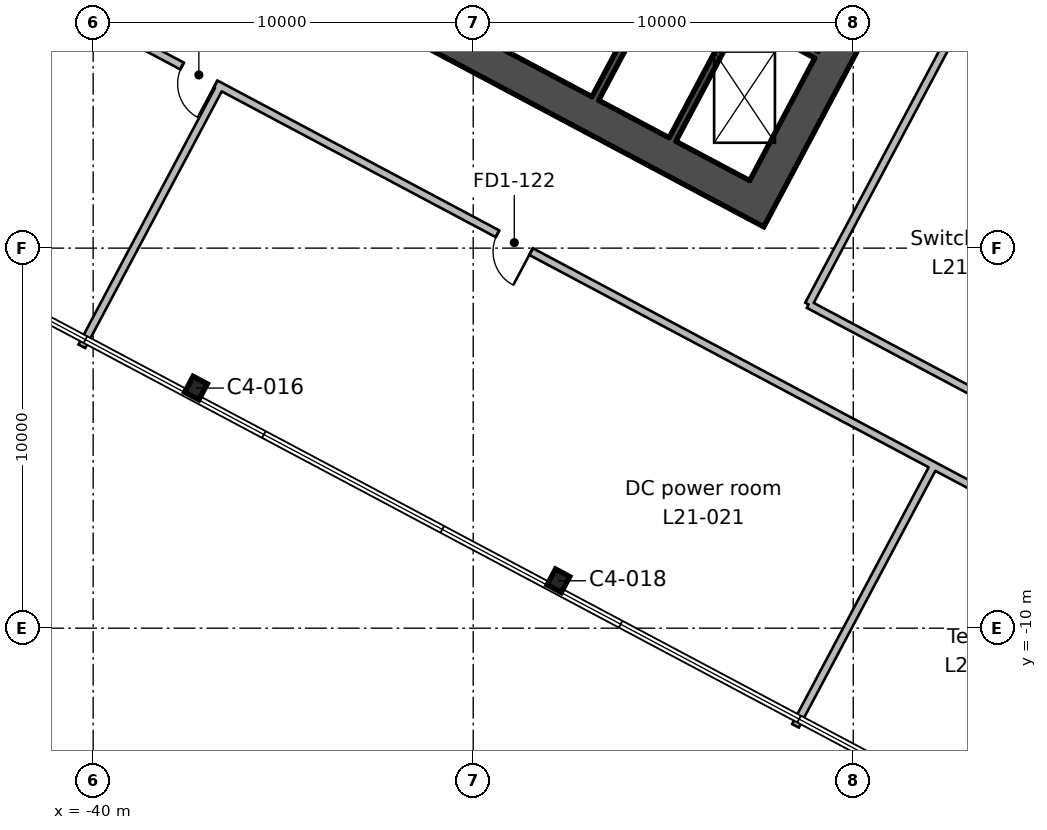
"""IFC4 building model, lengths in metres.
Left out: names, types, materials, properties, quantities, classifications, styles, units other than length and angle.
Written with IfcOpenShell. Run it as: python <this file> out.ifc"""

import sys

from ifc_helpers import new_model, si_unit, direction, frame, frame_2d, origin, origin_2d, place, context, subcontext, project, spatial, rectangle, i_section, extrude, element, fill, save


model = new_model("IFC4")
c1 = context("Model", 3, precision=1e-05, world=origin(), true_north=direction((0.0, 1.0)))
c2 = subcontext(c1, "Body", "Model", "MODEL_VIEW")
j1 = project(units=[si_unit("LENGTHUNIT", "METRE"), si_unit("PLANEANGLEUNIT", "RADIAN")], contexts=[c1])
p1 = place(None, origin())
s1 = spatial("IfcSite", under=j1, at=p1, CompositionType="ELEMENT")
p2 = place(p1, origin())
s2 = spatial("IfcBuilding", under=s1, at=p2, CompositionType="ELEMENT")
p3 = place(p2, frame((0.0, 0.0, 107.6)))
s3 = spatial("IfcBuildingStorey", under=s2, at=p3, CompositionType="ELEMENT", Elevation=107.6)
for number, where, z_axis, x_axis in (
    (1, (-27.758, -8.753, 0.0), (0.0, 0.0, 1.0), (0.883, -0.469, 0.0)),
    (2, (-37.294, -3.682, 0.0), (0.0, 0.0, 1.0), (0.883, -0.469, 0.0)),
):
    element("IfcColumn", number, at=place(p3, frame(where, z_axis=z_axis, x_axis=x_axis)), inside=s3, PredefinedType="COLUMN", context=c2, shape_type="SweptSolid", body=[
        extrude(i_section(OverallWidth=0.424, OverallDepth=0.475, WebThickness=0.048, FlangeThickness=0.077, FilletRadius=0.015, at=origin_2d()), origin(), (0.0, 0.0, 1.0), 4.6),
    ])
p4 = place(p3, frame((-13.362, 18.43, 0.0), z_axis=(0.0, 0.0, 1.0), x_axis=(-0.46947084998, -0.882947971864, 0.0)))
e3 = element("IfcWall", 3, at=p4, inside=s3, PredefinedType="SHEAR", context=c2, shape_type="SweptSolid", body=[
    extrude(rectangle(XDim=20.0, YDim=0.9, at=frame_2d((10.0, 0.0))), origin(), (0.0, 0.0, 1.0), 4.6),
])
p5 = place(p4, frame((7.0, 0.0, 0.0)))
e4 = element("IfcOpeningElement", 4, at=p5, cuts=e3, PredefinedType="OPENING", context=c2, shape_type="SweptSolid", body=[
    extrude(rectangle(XDim=2.4, YDim=2.4, at=frame_2d((1.2, 1.2))), frame((0.0, 0.46, 0.0), z_axis=(0.0, -1.0, 0.0), x_axis=(1.0, 0.0, 0.0)), (0.0, 0.0, 1.0), 0.92),
])
p6 = place(p3, frame((-22.937, 1.38, 0.0), z_axis=(0.0, 0.0, 1.0), x_axis=(-0.88295276571, 0.46946183394, 0.0)))
e5 = element("IfcWall", 5, at=p6, inside=s3, PredefinedType="SHEAR", context=c2, shape_type="SweptSolid", body=[
    extrude(rectangle(XDim=20.2, YDim=0.9, at=frame_2d((10.1, 0.0))), origin(), (0.0, 0.0, 1.0), 4.6),
])
p7 = place(p3, frame((-23.043, 6.08, 0.0), z_axis=(0.0, 0.0, 1.0), x_axis=(-0.469494272526, -0.882935517501, 0.0)))
e6 = element("IfcWall", 6, at=p7, inside=s3, PredefinedType="SHEAR", context=c2, shape_type="SweptSolid", body=[
    extrude(rectangle(XDim=3.65, YDim=0.2, at=frame_2d((1.825, 0.0))), origin(), (0.0, 0.0, 1.0), 4.6),
])
p8 = place(p3, frame((-23.36, 10.382, 0.0), z_axis=(0.0, 0.0, 1.0), x_axis=(-0.469480409012, -0.88294288918, 0.0)))
e7 = element("IfcWall", 7, at=p8, inside=s3, PredefinedType="SHEAR", context=c2, shape_type="SweptSolid", body=[
    extrude(rectangle(XDim=7.3, YDim=0.2, at=frame_2d((3.65, 0.0))), origin(), (0.0, 0.0, 1.0), 4.6),
])
p9 = place(p3, frame((-20.965, 5.088, 0.0), z_axis=(0.0, 0.0, 1.0), x_axis=(-0.882925986334, 0.469512196493, 0.0)))
e8 = element("IfcWall", 8, at=p9, inside=s3, PredefinedType="SHEAR", context=c2, shape_type="SweptSolid", body=[
    extrude(rectangle(XDim=4.5, YDim=0.2, at=frame_2d((2.25, 0.0))), origin(), (0.0, 0.0, 1.0), 4.6),
])
p10 = place(p9, frame((0.6, 0.0, 0.0)))
e9 = element("IfcOpeningElement", 9, at=p10, cuts=e8, PredefinedType="OPENING", context=c2, shape_type="SweptSolid", body=[
    extrude(rectangle(XDim=1.1, YDim=2.1, at=frame_2d((0.55, 1.05))), frame((0.0, 0.11, 0.0), z_axis=(0.0, -1.0, 0.0), x_axis=(1.0, 0.0, 0.0)), (0.0, 0.0, 1.0), 0.22),
])
p11 = place(p3, frame((-36.658, 4.259, 0.0), z_axis=(0.0, 0.0, 1.0), x_axis=(-0.469538267285, -0.882912122215, 0.0)))
e10 = element("IfcWall", 10, at=p11, inside=s3, PredefinedType="PARTITIONING", context=c2, shape_type="SweptSolid", body=[
    extrude(rectangle(XDim=7.75, YDim=0.2, at=frame_2d((3.875, 0.0))), origin(), (0.0, 0.0, 1.0), 4.15),
])
p12 = place(p3, frame((-13.6, -8.002, 0.0), z_axis=(0.0, 0.0, 1.0), x_axis=(-0.882949686262, 0.469467625646, 0.0)))
e11 = element("IfcWall", 11, at=p12, inside=s3, PredefinedType="PARTITIONING", context=c2, shape_type="SweptSolid", body=[
    extrude(rectangle(XDim=34.795, YDim=0.2, at=frame_2d((17.397, 0.0))), origin(), (0.0, 0.0, 1.0), 4.15),
])
p13 = place(p12, frame((26.25, 0.0, 0.0)))
e12 = element("IfcOpeningElement", 12, at=p13, cuts=e11, PredefinedType="OPENING", context=c2, shape_type="SweptSolid", body=[
    extrude(rectangle(XDim=1.0, YDim=2.1, at=frame_2d((0.5, 1.05))), frame((0.0, 0.11, 0.0), z_axis=(0.0, -1.0, 0.0), x_axis=(1.0, 0.0, 0.0)), (0.0, 0.0, 1.0), 0.22),
])
p14 = place(p12, frame((16.85, 0.0, 0.0)))
e13 = element("IfcOpeningElement", 13, at=p14, cuts=e11, PredefinedType="OPENING", context=c2, shape_type="SweptSolid", body=[
    extrude(rectangle(XDim=1.0, YDim=2.1, at=frame_2d((0.5, 1.05))), frame((0.0, 0.11, 0.0), z_axis=(0.0, -1.0, 0.0), x_axis=(1.0, 0.0, 0.0)), (0.0, 0.0, 1.0), 0.22),
])
p15 = place(p3, frame((-17.881, -5.725, 0.0), z_axis=(0.0, 0.0, 1.0), x_axis=(-0.469513711464, -0.882925180719, 0.0)))
e14 = element("IfcWall", 14, at=p15, inside=s3, PredefinedType="PARTITIONING", context=c2, shape_type="SweptSolid", body=[
    extrude(rectangle(XDim=7.75, YDim=0.2, at=frame_2d((3.875, 0.0))), origin(), (0.0, 0.0, 1.0), 4.15),
])
p16 = place(p3, frame((-21.175, -1.483, 0.0), z_axis=(0.0, 0.0, 1.0), x_axis=(0.469455871296, 0.882955935993, 0.0)))
e15 = element("IfcWall", 15, at=p16, inside=s3, PredefinedType="PARTITIONING", context=c2, shape_type="SweptSolid", body=[
    extrude(rectangle(XDim=22.5, YDim=0.2, at=frame_2d((11.25, 0.0))), origin(), (0.0, 0.0, 1.0), 4.15),
])
p17 = place(p16, frame((10.75, 0.0, 0.0)))
e16 = element("IfcOpeningElement", 16, at=p17, cuts=e15, PredefinedType="OPENING", context=c2, shape_type="SweptSolid", body=[
    extrude(rectangle(XDim=1.0, YDim=2.1, at=frame_2d((0.5, 1.05))), frame((0.0, 0.11, 0.0), z_axis=(0.0, -1.0, 0.0), x_axis=(1.0, 0.0, 0.0)), (0.0, 0.0, 1.0), 0.22),
])
p18 = place(p3, frame((-13.6, -5.51, 0.0), z_axis=(0.0, 0.0, 1.0), x_axis=(-0.882975295816, 0.469419457392, 0.0)))
e17 = element("IfcWall", 17, at=p18, inside=s3, PredefinedType="PARTITIONING", context=c2, shape_type="SweptSolid", body=[
    extrude(rectangle(XDim=8.579, YDim=0.2, at=frame_2d((4.29, 0.0))), origin(), (0.0, 0.0, 1.0), 4.15),
])
p19 = place(p13, origin())
e18 = element("IfcDoor", 18, at=p19, inside=s3, OperationType="SINGLE_SWING_LEFT", PredefinedType="DOOR", context=c2, shape_type="SweptSolid", body=[
    extrude(rectangle(XDim=1.0, YDim=2.1, at=frame_2d((0.5, 1.05))), frame((0.0, 0.025, 0.0), z_axis=(0.0, -1.0, 0.0), x_axis=(1.0, 0.0, 0.0)), (0.0, 0.0, 1.0), 0.05),
])
fill(e12, e18)
p20 = place(p14, origin())
e19 = element("IfcDoor", 19, at=p20, inside=s3, OperationType="SINGLE_SWING_LEFT", PredefinedType="DOOR", context=c2, shape_type="SweptSolid", body=[
    extrude(rectangle(XDim=1.0, YDim=2.1, at=frame_2d((0.5, 1.05))), frame((0.0, 0.025, 0.0), z_axis=(0.0, -1.0, 0.0), x_axis=(1.0, 0.0, 0.0)), (0.0, 0.0, 1.0), 0.05),
])
fill(e13, e19)
save(model, sys.argv[1])
